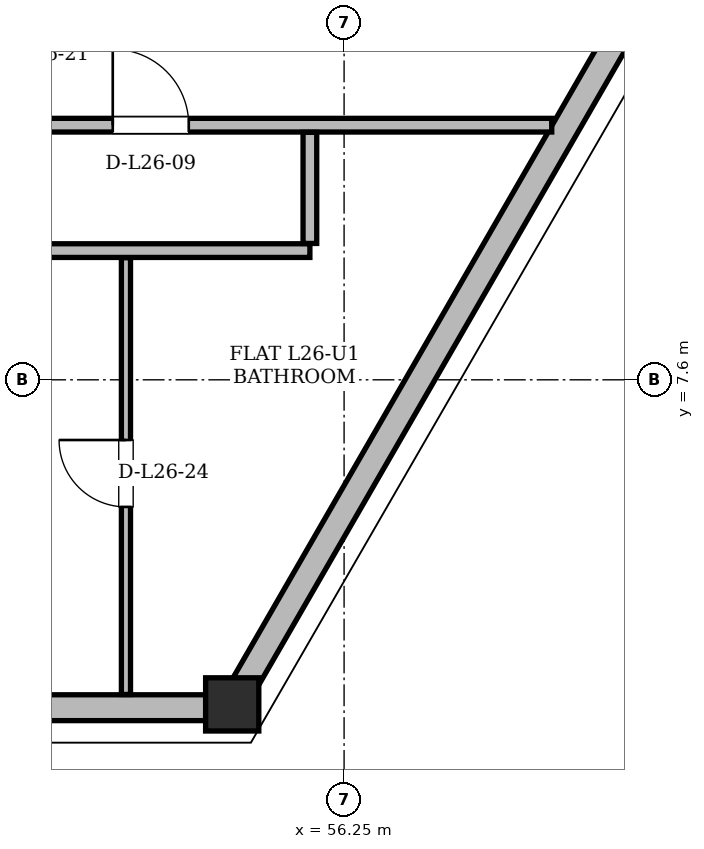
"""IFC4 building model, lengths in metres.
Left out: names, types, materials, properties, quantities, classifications, styles, units other than length and angle.
Written with IfcOpenShell. Run it as: python <this file> out.ifc"""

import sys

from ifc_helpers import new_model, si_unit, direction, frame, frame_2d, origin, origin_2d, place, context, subcontext, project, spatial, rectangle, hollow_rectangle, extrude, element, fill, save


model = new_model("IFC4")
c1 = context("Model", 3, precision=1e-05, world=origin(), true_north=direction((0.0, 1.0)))
c2 = subcontext(c1, "Body", "Model", "MODEL_VIEW")
j1 = project(units=[si_unit("LENGTHUNIT", "METRE"), si_unit("PLANEANGLEUNIT", "RADIAN")], contexts=[c1])
p1 = place(None, origin())
s1 = spatial("IfcSite", under=j1, at=p1, CompositionType="ELEMENT")
p2 = place(p1, origin())
s2 = spatial("IfcBuilding", under=s1, at=p2, CompositionType="ELEMENT")
p3 = place(p2, frame((0.0, 0.0, 100.5)))
s3 = spatial("IfcBuildingStorey", under=s2, at=p3, CompositionType="ELEMENT", Elevation=100.5)
p4 = place(p3, frame((54.758, 3.286, 0.004), z_axis=(0.010941819995, 0.024194334896, 0.999647393201), x_axis=(-0.911153685681, 0.412066694929, 0.0)))
e1 = element("IfcColumn", 1, at=p4, inside=s3, PredefinedType="COLUMN", context=c2, shape_type="SweptSolid", body=[
    extrude(hollow_rectangle(XDim=0.7, YDim=0.7, WallThickness=0.055, at=origin_2d()), origin(), (0.0, 0.0, 1.0), 3.592),
])
p5 = place(p3, frame((20.242, 3.286, 0.0), z_axis=(0.0, 0.0, 1.0), x_axis=(1.0, 0.0, 0.0)))
e2 = element("IfcWall", 2, at=p5, inside=s3, PredefinedType="SOLIDWALL", context=c2, shape_type="SweptSolid", body=[
    extrude(rectangle(XDim=34.517, YDim=0.34, at=frame_2d((17.258, 0.0))), origin(), (0.0, 0.0, 1.0), 2.578),
])
p6 = place(p5, frame((7.824, 0.0, 0.0)))
e3 = element("IfcOpeningElement", 3, at=p6, cuts=e2, PredefinedType="OPENING", context=c2, shape_type="SweptSolid", body=[
    extrude(rectangle(XDim=1.5, YDim=2.2, at=frame_2d((0.75, 1.1))), frame((0.0, 0.17, 0.0), z_axis=(0.0, -1.0, 0.0), x_axis=(1.0, 0.0, 0.0)), (0.0, 0.0, 1.0), 0.34),
])
p7 = place(p5, frame((26.647, 0.0, 0.0)))
e4 = element("IfcOpeningElement", 4, at=p7, cuts=e2, PredefinedType="OPENING", context=c2, shape_type="SweptSolid", body=[
    extrude(rectangle(XDim=1.5, YDim=2.2, at=frame_2d((0.75, 1.1))), frame((0.0, 0.17, 0.0), z_axis=(0.0, -1.0, 0.0), x_axis=(1.0, 0.0, 0.0)), (0.0, 0.0, 1.0), 0.34),
])
p8 = place(p5, frame((16.671, 0.0, 0.85)))
e5 = element("IfcOpeningElement", 5, at=p8, cuts=e2, PredefinedType="OPENING", context=c2, shape_type="SweptSolid", body=[
    extrude(rectangle(XDim=1.2, YDim=1.48, at=frame_2d((0.6, 0.74))), frame((0.0, 0.17, 0.0), z_axis=(0.0, -1.0, 0.0), x_axis=(1.0, 0.0, 0.0)), (0.0, 0.0, 1.0), 0.34),
])
p9 = place(p5, frame((25.083, 0.0, 0.85)))
e6 = element("IfcOpeningElement", 6, at=p9, cuts=e2, PredefinedType="OPENING", context=c2, shape_type="SweptSolid", body=[
    extrude(rectangle(XDim=1.2, YDim=1.48, at=frame_2d((0.6, 0.74))), frame((0.0, 0.17, 0.0), z_axis=(0.0, -1.0, 0.0), x_axis=(1.0, 0.0, 0.0)), (0.0, 0.0, 1.0), 0.34),
])
p10 = place(p5, frame((2.39, 0.0, 0.85)))
e7 = element("IfcOpeningElement", 7, at=p10, cuts=e2, PredefinedType="OPENING", context=c2, shape_type="SweptSolid", body=[
    extrude(rectangle(XDim=1.2, YDim=1.48, at=frame_2d((0.6, 0.74))), frame((0.0, 0.17, 0.0), z_axis=(0.0, -1.0, 0.0), x_axis=(1.0, 0.0, 0.0)), (0.0, 0.0, 1.0), 0.34),
])
p11 = place(p5, frame((11.613, 0.0, 0.85)))
e8 = element("IfcOpeningElement", 8, at=p11, cuts=e2, PredefinedType="OPENING", context=c2, shape_type="SweptSolid", body=[
    extrude(rectangle(XDim=1.2, YDim=1.48, at=frame_2d((0.6, 0.74))), frame((0.0, 0.17, 0.0), z_axis=(0.0, -1.0, 0.0), x_axis=(1.0, 0.0, 0.0)), (0.0, 0.0, 1.0), 0.34),
])
p12 = place(p3, frame((54.758, 3.286, 0.0), z_axis=(0.0, 0.0, 1.0), x_axis=(0.4999967785, 0.866027263711, 0.0)))
e9 = element("IfcWall", 9, at=p12, inside=s3, PredefinedType="SOLIDWALL", context=c2, shape_type="SweptSolid", body=[
    extrude(rectangle(XDim=11.864, YDim=0.34, at=frame_2d((5.932, 0.0))), origin(), (0.0, 0.0, 1.0), 2.578),
])
p13 = place(p3, frame((19.2, 9.3, 0.0), z_axis=(0.0, 0.0, 1.0), x_axis=(1.0, 0.0, 0.0)))
e10 = element("IfcWall", 10, at=p13, inside=s3, PredefinedType="PARTITIONING", context=c2, shape_type="SweptSolid", body=[
    extrude(rectangle(XDim=36.6, YDim=0.18, at=frame_2d((18.3, 0.0))), origin(), (0.0, 0.0, 1.0), 2.814),
])
p14 = place(p13, frame((6.546, 0.0, 0.0)))
e11 = element("IfcOpeningElement", 11, at=p14, cuts=e10, PredefinedType="OPENING", context=c2, shape_type="SweptSolid", body=[
    extrude(rectangle(XDim=1.0, YDim=2.18, at=frame_2d((0.5, 1.09))), frame((0.0, 0.09, 0.0), z_axis=(0.0, -1.0, 0.0), x_axis=(1.0, 0.0, 0.0)), (0.0, 0.0, 1.0), 0.18),
])
p15 = place(p13, frame((23.539, 0.0, 0.0)))
e12 = element("IfcOpeningElement", 12, at=p15, cuts=e10, PredefinedType="OPENING", context=c2, shape_type="SweptSolid", body=[
    extrude(rectangle(XDim=1.0, YDim=2.18, at=frame_2d((0.5, 1.09))), frame((0.0, 0.09, 0.0), z_axis=(0.0, -1.0, 0.0), x_axis=(1.0, 0.0, 0.0)), (0.0, 0.0, 1.0), 0.18),
])
p16 = place(p3, frame((47.45, 10.95, 0.0), z_axis=(0.0, 0.0, 1.0), x_axis=(1.0, 0.0, 0.0)))
e13 = element("IfcWall", 13, at=p16, inside=s3, PredefinedType="PARTITIONING", context=c2, shape_type="SweptSolid", body=[
    extrude(rectangle(XDim=11.532, YDim=0.18, at=frame_2d((5.766, 0.0))), origin(), (0.0, 0.0, 1.0), 3.36),
])
p17 = place(p16, frame((5.756, 0.0, 0.0)))
e14 = element("IfcOpeningElement", 14, at=p17, cuts=e13, PredefinedType="OPENING", context=c2, shape_type="SweptSolid", body=[
    extrude(rectangle(XDim=1.0, YDim=2.18, at=frame_2d((0.5, 1.09))), frame((0.0, 0.09, 0.0), z_axis=(0.0, -1.0, 0.0), x_axis=(1.0, 0.0, 0.0)), (0.0, 0.0, 1.0), 0.18),
])
p18 = place(p3, frame((53.38, 3.46, 0.0), z_axis=(0.0, 0.0, 1.0), x_axis=(0.0, 1.0, 0.0)))
e15 = element("IfcWall", 15, at=p18, inside=s3, PredefinedType="PARTITIONING", context=c2, shape_type="SweptSolid", body=[
    extrude(rectangle(XDim=5.746, YDim=0.12, at=frame_2d((2.873, 0.0))), origin(), (0.0, 0.0, 1.0), 2.814),
])
p19 = place(p18, frame((2.468, 0.0, 0.0)))
e16 = element("IfcOpeningElement", 16, at=p19, cuts=e15, PredefinedType="OPENING", context=c2, shape_type="SweptSolid", body=[
    extrude(rectangle(XDim=0.88, YDim=2.08, at=frame_2d((0.44, 1.04))), frame((0.0, 0.06, 0.0), z_axis=(0.0, -1.0, 0.0), x_axis=(1.0, 0.0, 0.0)), (0.0, 0.0, 1.0), 0.12),
])
p20 = place(p3, frame((55.8, 9.394, 0.0), z_axis=(0.0, 0.0, 1.0), x_axis=(0.0, 1.0, 0.0)))
e17 = element("IfcWall", 17, at=p20, inside=s3, PredefinedType="PARTITIONING", context=c2, shape_type="SweptSolid", body=[
    extrude(rectangle(XDim=1.462, YDim=0.18, at=frame_2d((0.731, 0.0))), origin(), (0.0, 0.0, 1.0), 3.36),
])
p21 = place(p17, origin())
e18 = element("IfcDoor", 18, at=p21, inside=s3, OperationType="SINGLE_SWING_LEFT", PredefinedType="DOOR", context=c2, shape_type="SweptSolid", body=[
    extrude(rectangle(XDim=1.0, YDim=2.18, at=frame_2d((0.5, 1.09))), frame((0.0, 0.025, 0.0), z_axis=(0.0, -1.0, 0.0), x_axis=(1.0, 0.0, 0.0)), (0.0, 0.0, 1.0), 0.05),
])
fill(e14, e18)
p22 = place(p19, origin())
e19 = element("IfcDoor", 19, at=p22, inside=s3, OperationType="SINGLE_SWING_RIGHT", PredefinedType="DOOR", context=c2, shape_type="SweptSolid", body=[
    extrude(rectangle(XDim=0.88, YDim=2.08, at=frame_2d((0.44, 1.04))), frame((0.0, 0.025, 0.0), z_axis=(0.0, -1.0, 0.0), x_axis=(1.0, 0.0, 0.0)), (0.0, 0.0, 1.0), 0.05),
])
fill(e16, e19)
save(model, sys.argv[1])
